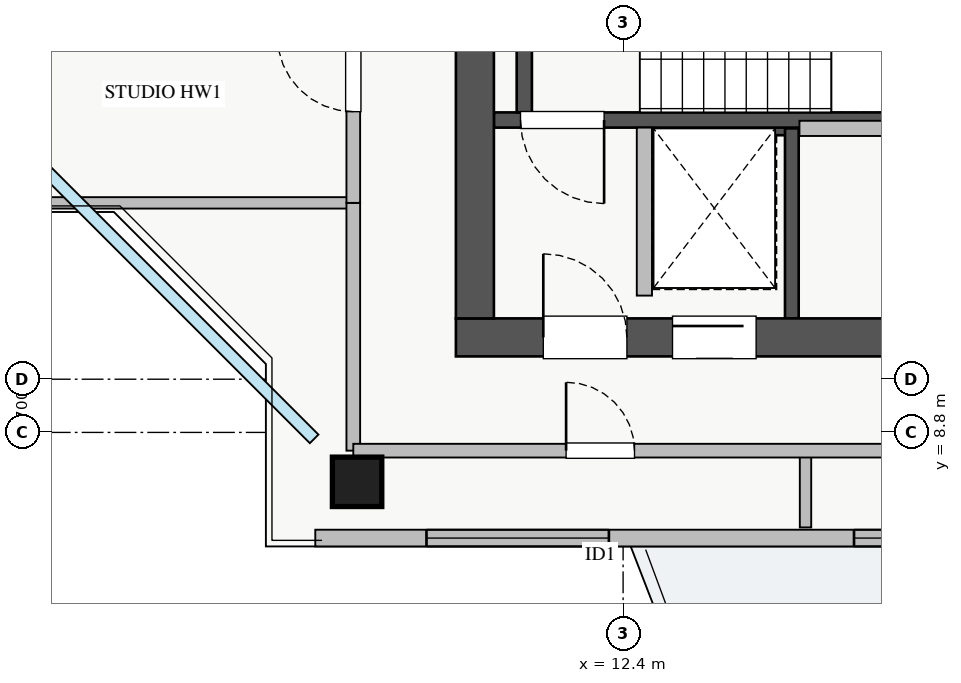
"""IFC4 building model, lengths in metres.
Left out: names, types, materials, properties, quantities, classifications, styles, units other than length and angle.
Written with IfcOpenShell. Run it as: python <this file> out.ifc"""

import sys

from ifc_helpers import new_model, si_unit, direction, frame, frame_2d, origin, origin_2d, place, context, subcontext, project, spatial, rectangle, extrude, source, transform, mapped, element, fill, save


model = new_model("IFC4")
c1 = context("Model", 3, precision=1e-05, world=origin(), true_north=direction((0.0, 1.0)))
c2 = subcontext(c1, "Body", "Model", "MODEL_VIEW")
j1 = project(units=[si_unit("LENGTHUNIT", "METRE"), si_unit("PLANEANGLEUNIT", "RADIAN")], contexts=[c1])
p1 = place(None, origin())
s1 = spatial("IfcSite", under=j1, at=p1, CompositionType="ELEMENT")
p2 = place(p1, origin())
s2 = spatial("IfcBuilding", under=s1, at=p2, CompositionType="ELEMENT")
p3 = place(p2, frame((0.0, 0.0, 256.75)))
s3 = spatial("IfcBuildingStorey", under=s2, at=p3, CompositionType="ELEMENT", Elevation=256.75)
p4 = place(p3, frame((12.68, 12.8, 0.0), z_axis=(0.0, 0.0, 1.0), x_axis=(1.0, 0.0, 0.0)))
e1 = element("IfcWall", 1, at=p4, inside=s3, PredefinedType="SHEAR", context=c2, shape_type="SweptSolid", body=[
    extrude(rectangle(XDim=1.94, YDim=0.18, at=frame_2d((0.97, 0.0))), origin(), (0.0, 0.0, 1.0), 3.07),
])
p5 = place(p3, frame((14.62, 10.3, 0.0), z_axis=(0.0, 0.0, 1.0), x_axis=(0.0, 1.0, 0.0)))
e2 = element("IfcWall", 2, at=p5, inside=s3, PredefinedType="SHEAR", context=c2, shape_type="SweptSolid", body=[
    extrude(rectangle(XDim=2.5, YDim=0.18, at=frame_2d((1.25, 0.0))), origin(), (0.0, 0.0, 1.0), 3.07),
])
p6 = place(p3, frame((10.7, 12.91, 0.0), z_axis=(0.0, 0.0, 1.0), x_axis=(1.0, 0.0, 0.0)))
e3 = element("IfcWall", 3, at=p6, inside=s3, PredefinedType="SHEAR", context=c2, shape_type="SweptSolid", body=[
    extrude(rectangle(XDim=7.45, YDim=0.2, at=frame_2d((3.725, 0.0))), origin(), (0.0, 0.0, 1.0), 3.25),
])
p7 = place(p6, frame((0.35, 0.0, 0.0)))
e4 = element("IfcOpeningElement", 4, at=p7, cuts=e3, PredefinedType="OPENING", context=c2, shape_type="SweptSolid", body=[
    extrude(rectangle(XDim=1.1, YDim=2.05, at=frame_2d((0.55, 1.025))), frame((0.0, 0.11, 0.0), z_axis=(0.0, -1.0, 0.0), x_axis=(1.0, 0.0, 0.0)), (0.0, 0.0, 1.0), 0.22),
])
p8 = place(p3, frame((11.1, 13.01, 0.0), z_axis=(0.0, 0.0, 1.0), x_axis=(0.0, 1.0, 0.0)))
e5 = element("IfcWall", 5, at=p8, inside=s3, PredefinedType="SHEAR", context=c2, shape_type="SweptSolid", body=[
    extrude(rectangle(XDim=2.94, YDim=0.2, at=frame_2d((1.47, 0.0))), origin(), (0.0, 0.0, 1.0), 3.25),
])
p9 = place(p3, frame((10.2, 10.05, 0.0), z_axis=(0.0, 0.0, 1.0), x_axis=(1.0, 0.0, 0.0)))
e6 = element("IfcWall", 6, at=p9, inside=s3, PredefinedType="SHEAR", context=c2, shape_type="SweptSolid", body=[
    extrude(rectangle(XDim=17.6, YDim=0.5, at=frame_2d((8.8, 0.0))), origin(), (0.0, 0.0, 1.0), 3.25),
])
p10 = place(p9, frame((1.15, 0.0, 0.0)))
e7 = element("IfcOpeningElement", 7, at=p10, cuts=e6, PredefinedType="OPENING", context=c2, shape_type="SweptSolid", body=[
    extrude(rectangle(XDim=1.1, YDim=2.05, at=frame_2d((0.55, 1.025))), frame((0.0, 0.26, 0.0), z_axis=(0.0, -1.0, 0.0), x_axis=(1.0, 0.0, 0.0)), (0.0, 0.0, 1.0), 0.52),
])
p11 = place(p9, frame((8.3, 0.0, 0.0)))
e8 = element("IfcOpeningElement", 8, at=p11, cuts=e6, PredefinedType="OPENING", context=c2, shape_type="SweptSolid", body=[
    extrude(rectangle(XDim=1.1, YDim=2.05, at=frame_2d((0.55, 1.025))), frame((0.0, 0.26, 0.0), z_axis=(0.0, -1.0, 0.0), x_axis=(1.0, 0.0, 0.0)), (0.0, 0.0, 1.0), 0.52),
])
p12 = place(p9, frame((2.85, 0.0, 0.0)))
e9 = element("IfcOpeningElement", 9, at=p12, cuts=e6, PredefinedType="OPENING", context=c2, shape_type="SweptSolid", body=[
    extrude(rectangle(XDim=1.1, YDim=2.05, at=frame_2d((0.55, 1.025))), frame((0.0, 0.26, 0.0), z_axis=(0.0, -1.0, 0.0), x_axis=(1.0, 0.0, 0.0)), (0.0, 0.0, 1.0), 0.52),
])
p13 = place(p9, frame((5.8, 0.0, 0.0)))
e10 = element("IfcOpeningElement", 10, at=p13, cuts=e6, PredefinedType="OPENING", context=c2, shape_type="SweptSolid", body=[
    extrude(rectangle(XDim=1.0, YDim=2.05, at=frame_2d((0.5, 1.025))), frame((0.0, 0.26, 0.0), z_axis=(0.0, -1.0, 0.0), x_axis=(1.0, 0.0, 0.0)), (0.0, 0.0, 1.0), 0.52),
])
p14 = place(p9, frame((14.74, 0.0, 0.0)))
e11 = element("IfcOpeningElement", 11, at=p14, cuts=e6, PredefinedType="OPENING", context=c2, shape_type="SweptSolid", body=[
    extrude(rectangle(XDim=1.0, YDim=2.05, at=frame_2d((0.5, 1.025))), frame((0.0, 0.26, 0.0), z_axis=(0.0, -1.0, 0.0), x_axis=(1.0, 0.0, 0.0)), (0.0, 0.0, 1.0), 0.52),
])
p15 = place(p9, frame((11.67, 0.0, 0.0)))
e12 = element("IfcOpeningElement", 12, at=p15, cuts=e6, PredefinedType="OPENING", context=c2, shape_type="SweptSolid", body=[
    extrude(rectangle(XDim=1.0, YDim=2.05, at=frame_2d((0.5, 1.025))), frame((0.0, 0.26, 0.0), z_axis=(0.0, -1.0, 0.0), x_axis=(1.0, 0.0, 0.0)), (0.0, 0.0, 1.0), 0.52),
])
p16 = place(p3, frame((10.45, 10.3, 0.0), z_axis=(0.0, 0.0, 1.0), x_axis=(0.0, 1.0, 0.0)))
e13 = element("IfcWall", 13, at=p16, inside=s3, PredefinedType="SHEAR", context=c2, shape_type="SweptSolid", body=[
    extrude(rectangle(XDim=6.2, YDim=0.5, at=frame_2d((3.1, 0.0))), origin(), (0.0, 0.0, 1.0), 3.25),
])
m1 = source(origin(), c2, "Body", "SweptSolid", [
    extrude(rectangle(XDim=0.65, YDim=0.65, at=origin_2d()), origin(), (0.0, 0.0, 1.0), 3.25),
])
p17 = place(p3, frame((8.9, 8.15, 0.0), z_axis=(0.0, 0.0, 1.0), x_axis=(1.0, 0.0, 0.0)))
e14 = element("IfcColumn", 14, at=p17, inside=s3, PredefinedType="COLUMN", context=c2, shape_type="MappedRepresentation", body=[
    mapped(m1, transform((0.0, 0.0, 0.0), x_axis=(1.0, 0.0, 0.0), y_axis=(0.0, 1.0, 0.0), z_axis=(0.0, 0.0, 1.0), scale=1.0)),
])
p18 = place(p3, frame((8.35, 7.41, 0.0), z_axis=(0.0, 0.0, 1.0), x_axis=(1.0, 0.0, 0.0)))
e15 = element("IfcWall", 15, at=p18, inside=s3, PredefinedType="STANDARD", context=c2, shape_type="SweptSolid", body=[
    extrude(rectangle(XDim=21.3, YDim=0.22, at=frame_2d((10.65, 0.0))), origin(), (0.0, 0.0, 1.0), 2.61),
])
p19 = place(p18, frame((11.5, 0.0, 0.0)))
e16 = element("IfcOpeningElement", 16, at=p19, cuts=e15, PredefinedType="OPENING", context=c2, shape_type="SweptSolid", body=[
    extrude(rectangle(XDim=1.2, YDim=2.1, at=frame_2d((0.6, 1.05))), frame((0.0, 0.12, 0.0), z_axis=(0.0, -1.0, 0.0), x_axis=(1.0, 0.0, 0.0)), (0.0, 0.0, 1.0), 0.24),
])
p20 = place(p18, frame((1.463, 0.0, 0.9)))
e17 = element("IfcOpeningElement", 17, at=p20, cuts=e15, PredefinedType="OPENING", context=c2, shape_type="SweptSolid", body=[
    extrude(rectangle(XDim=2.4, YDim=1.48, at=frame_2d((1.2, 0.74))), frame((0.0, 0.12, 0.0), z_axis=(0.0, -1.0, 0.0), x_axis=(1.0, 0.0, 0.0)), (0.0, 0.0, 1.0), 0.24),
])
p21 = place(p18, frame((7.088, 0.0, 0.9)))
e18 = element("IfcOpeningElement", 18, at=p21, cuts=e15, PredefinedType="OPENING", context=c2, shape_type="SweptSolid", body=[
    extrude(rectangle(XDim=1.8, YDim=1.45, at=frame_2d((0.9, 0.725))), frame((0.0, 0.12, 0.0), z_axis=(0.0, -1.0, 0.0), x_axis=(1.0, 0.0, 0.0)), (0.0, 0.0, 1.0), 0.24),
])
p22 = place(p18, frame((19.775, 0.0, 0.9)))
e19 = element("IfcOpeningElement", 19, at=p22, cuts=e15, PredefinedType="OPENING", context=c2, shape_type="SweptSolid", body=[
    extrude(rectangle(XDim=1.2, YDim=1.4, at=frame_2d((0.6, 0.7))), frame((0.0, 0.12, 0.0), z_axis=(0.0, -1.0, 0.0), x_axis=(1.0, 0.0, 0.0)), (0.0, 0.0, 1.0), 0.24),
])
p23 = place(p18, frame((15.042, 0.0, 0.9)))
e20 = element("IfcOpeningElement", 20, at=p23, cuts=e15, PredefinedType="OPENING", context=c2, shape_type="SweptSolid", body=[
    extrude(rectangle(XDim=2.4, YDim=1.5, at=frame_2d((1.2, 0.75))), frame((0.0, 0.12, 0.0), z_axis=(0.0, -1.0, 0.0), x_axis=(1.0, 0.0, 0.0)), (0.0, 0.0, 1.0), 0.24),
])
p24 = place(p3, frame((12.68, 10.6, 0.0), z_axis=(0.0, 0.0, 1.0), x_axis=(0.0, 1.0, 0.0)))
e21 = element("IfcWall", 21, at=p24, inside=s3, PredefinedType="PARTITIONING", context=c2, shape_type="SweptSolid", body=[
    extrude(rectangle(XDim=2.21, YDim=0.2, at=frame_2d((1.105, 0.0))), origin(), (0.0, 0.0, 1.0), 3.07),
])
p25 = place(p3, frame((14.72, 12.8, 0.0), z_axis=(0.0, 0.0, 1.0), x_axis=(1.0, 0.0, 0.0)))
e22 = element("IfcWall", 22, at=p25, inside=s3, PredefinedType="PARTITIONING", context=c2, shape_type="SweptSolid", body=[
    extrude(rectangle(XDim=3.28, YDim=0.2, at=frame_2d((1.64, 0.0))), origin(), (0.0, 0.0, 1.0), 3.07),
])
p26 = place(p3, frame((3.55, 11.82, 0.0), z_axis=(0.0, 0.0, 1.0), x_axis=(1.0, 0.0, 0.0)))
e23 = element("IfcWall", 23, at=p26, inside=s3, PredefinedType="PARTITIONING", context=c2, shape_type="SweptSolid", body=[
    extrude(rectangle(XDim=5.3, YDim=0.15, at=frame_2d((2.65, 0.0))), origin(), (0.0, 0.0, 1.0), 3.07),
])
p27 = place(p3, frame((8.85, 8.56, 0.0), z_axis=(0.0, 0.0, 1.0), x_axis=(0.0, 1.0, 0.0)))
e24 = element("IfcWall", 24, at=p27, inside=s3, PredefinedType="PARTITIONING", context=c2, shape_type="SweptSolid", body=[
    extrude(rectangle(XDim=3.26, YDim=0.18, at=frame_2d((1.63, 0.0))), origin(), (0.0, 0.0, 1.0), 2.569),
])
p28 = place(p3, frame((14.8, 7.55, 0.0), z_axis=(0.0, 0.0, 1.0), x_axis=(0.0, 1.0, 0.0)))
e25 = element("IfcWall", 25, at=p28, inside=s3, PredefinedType="PARTITIONING", context=c2, shape_type="SweptSolid", body=[
    extrude(rectangle(XDim=1.01, YDim=0.15, at=frame_2d((0.505, 0.0))), origin(), (0.0, 0.0, 1.0), 3.07),
])
p29 = place(p3, frame((8.85, 8.56, 0.0), z_axis=(0.0, 0.0, 1.0), x_axis=(1.0, 0.0, 0.0)))
e26 = element("IfcWall", 26, at=p29, inside=s3, PredefinedType="PARTITIONING", context=c2, shape_type="SweptSolid", body=[
    extrude(rectangle(XDim=18.95, YDim=0.18, at=frame_2d((9.475, 0.0))), origin(), (0.0, 0.0, 1.0), 3.07),
])
p30 = place(p29, frame((2.8, 0.0, 0.0)))
e27 = element("IfcOpeningElement", 27, at=p30, cuts=e26, PredefinedType="OPENING", context=c2, shape_type="SweptSolid", body=[
    extrude(rectangle(XDim=0.9, YDim=2.05, at=frame_2d((0.45, 1.025))), frame((0.0, 0.1, 0.0), z_axis=(0.0, -1.0, 0.0), x_axis=(1.0, 0.0, 0.0)), (0.0, 0.0, 1.0), 0.2),
])
p31 = place(p29, frame((8.8, 0.0, 0.0)))
e28 = element("IfcOpeningElement", 28, at=p31, cuts=e26, PredefinedType="OPENING", context=c2, shape_type="SweptSolid", body=[
    extrude(rectangle(XDim=0.9, YDim=2.05, at=frame_2d((0.45, 1.025))), frame((0.0, 0.1, 0.0), z_axis=(0.0, -1.0, 0.0), x_axis=(1.0, 0.0, 0.0)), (0.0, 0.0, 1.0), 0.2),
])
p32 = place(p29, frame((15.2, 0.0, 0.0)))
e29 = element("IfcOpeningElement", 29, at=p32, cuts=e26, PredefinedType="OPENING", context=c2, shape_type="SweptSolid", body=[
    extrude(rectangle(XDim=0.9, YDim=2.05, at=frame_2d((0.45, 1.025))), frame((0.0, 0.1, 0.0), z_axis=(0.0, -1.0, 0.0), x_axis=(1.0, 0.0, 0.0)), (0.0, 0.0, 1.0), 0.2),
])
p33 = place(p3, frame((8.85, 11.82, 0.0), z_axis=(0.0, 0.0, 1.0), x_axis=(0.0, 1.0, 0.0)))
e30 = element("IfcWall", 30, at=p33, inside=s3, PredefinedType="PARTITIONING", context=c2, shape_type="SweptSolid", body=[
    extrude(rectangle(XDim=22.36, YDim=0.18, at=frame_2d((11.18, 0.0))), origin(), (0.0, 0.0, 1.0), 2.569),
])
p34 = place(p33, frame((1.2, 0.0, 0.0)))
e31 = element("IfcOpeningElement", 31, at=p34, cuts=e30, PredefinedType="OPENING", context=c2, shape_type="SweptSolid", body=[
    extrude(rectangle(XDim=1.0, YDim=2.05, at=frame_2d((0.5, 1.025))), frame((0.0, 0.1, 0.0), z_axis=(0.0, -1.0, 0.0), x_axis=(1.0, 0.0, 0.0)), (0.0, 0.0, 1.0), 0.2),
])
p35 = place(p33, frame((8.445, 0.0, 0.0)))
e32 = element("IfcOpeningElement", 32, at=p35, cuts=e30, PredefinedType="OPENING", context=c2, shape_type="SweptSolid", body=[
    extrude(rectangle(XDim=1.0, YDim=2.05, at=frame_2d((0.5, 1.025))), frame((0.0, 0.1, 0.0), z_axis=(0.0, -1.0, 0.0), x_axis=(1.0, 0.0, 0.0)), (0.0, 0.0, 1.0), 0.2),
])
p36 = place(p33, frame((16.23, 0.0, 0.0)))
e33 = element("IfcOpeningElement", 33, at=p36, cuts=e30, PredefinedType="OPENING", context=c2, shape_type="SweptSolid", body=[
    extrude(rectangle(XDim=1.0, YDim=2.05, at=frame_2d((0.5, 1.025))), frame((0.0, 0.1, 0.0), z_axis=(0.0, -1.0, 0.0), x_axis=(1.0, 0.0, 0.0)), (0.0, 0.0, 1.0), 0.2),
])
m2 = source(origin(), c2, "Body", "SweptSolid", [
    extrude(rectangle(XDim=2.4, YDim=1.48, at=frame_2d((1.2, 0.74))), frame((0.0, 0.03, 0.0), z_axis=(0.0, -1.0, 0.0), x_axis=(1.0, 0.0, 0.0)), (0.0, 0.0, 1.0), 0.06),
])
p37 = place(p20, origin())
e34 = element("IfcWindow", 34, at=p37, inside=s3, PartitioningType="TRIPLE_PANEL_VERTICAL", PredefinedType="WINDOW", context=c2, shape_type="MappedRepresentation", body=[
    mapped(m2, transform((0.0, 0.0, 0.0), x_axis=(1.0, 0.0, 0.0), y_axis=(0.0, 1.0, 0.0), z_axis=(0.0, 0.0, 1.0), scale=1.0)),
])
fill(e17, e34)
m3 = source(origin(), c2, "Body", "SweptSolid", [
    extrude(rectangle(XDim=1.8, YDim=1.45, at=frame_2d((0.9, 0.725))), frame((0.0, 0.03, 0.0), z_axis=(0.0, -1.0, 0.0), x_axis=(1.0, 0.0, 0.0)), (0.0, 0.0, 1.0), 0.06),
])
p38 = place(p21, origin())
e35 = element("IfcWindow", 35, at=p38, inside=s3, PartitioningType="DOUBLE_PANEL_VERTICAL", PredefinedType="WINDOW", context=c2, shape_type="MappedRepresentation", body=[
    mapped(m3, transform((0.0, 0.0, 0.0), x_axis=(1.0, 0.0, 0.0), y_axis=(0.0, 1.0, 0.0), z_axis=(0.0, 0.0, 1.0), scale=1.0)),
])
fill(e18, e35)
m4 = source(origin(), c2, "Body", "SweptSolid", [
    extrude(rectangle(XDim=1.1, YDim=2.05, at=frame_2d((0.55, 1.025))), frame((0.0, 0.025, 0.0), z_axis=(0.0, -1.0, 0.0), x_axis=(1.0, 0.0, 0.0)), (0.0, 0.0, 1.0), 0.05),
])
p39 = place(p10, origin())
e36 = element("IfcDoor", 36, at=p39, inside=s3, OperationType="SINGLE_SWING_LEFT", PredefinedType="DOOR", context=c2, shape_type="MappedRepresentation", body=[
    mapped(m4, transform((0.0, 0.0, 0.0), x_axis=(1.0, 0.0, 0.0), y_axis=(0.0, 1.0, 0.0), z_axis=(0.0, 0.0, 1.0), scale=1.0)),
])
fill(e7, e36)
p40 = place(p7, frame((1.1, 0.0, 0.0), z_axis=(0.0, 0.0, 1.0), x_axis=(-1.0, 0.0, 0.0)))
e37 = element("IfcDoor", 37, at=p40, inside=s3, OperationType="SINGLE_SWING_RIGHT", PredefinedType="DOOR", context=c2, shape_type="MappedRepresentation", body=[
    mapped(m4, transform((0.0, 0.0, 0.0), x_axis=(1.0, 0.0, 0.0), y_axis=(0.0, 1.0, 0.0), z_axis=(0.0, 0.0, 1.0), scale=1.0)),
])
fill(e4, e37)
p41 = place(p12, origin())
e38 = element("IfcDoor", 38, at=p41, inside=s3, OperationType="SLIDING_TO_RIGHT", PredefinedType="DOOR", context=c2, shape_type="MappedRepresentation", body=[
    mapped(m4, transform((0.0, 0.0, 0.0), x_axis=(1.0, 0.0, 0.0), y_axis=(0.0, 1.0, 0.0), z_axis=(0.0, 0.0, 1.0), scale=1.0)),
])
fill(e9, e38)
m5 = source(origin(), c2, "Body", "SweptSolid", [
    extrude(rectangle(XDim=0.9, YDim=2.05, at=frame_2d((0.45, 1.025))), frame((0.0, 0.025, 0.0), z_axis=(0.0, -1.0, 0.0), x_axis=(1.0, 0.0, 0.0)), (0.0, 0.0, 1.0), 0.05),
])
p42 = place(p30, origin())
e39 = element("IfcDoor", 39, at=p42, inside=s3, OperationType="SINGLE_SWING_LEFT", PredefinedType="DOOR", context=c2, shape_type="MappedRepresentation", body=[
    mapped(m5, transform((0.0, 0.0, 0.0), x_axis=(1.0, 0.0, 0.0), y_axis=(0.0, 1.0, 0.0), z_axis=(0.0, 0.0, 1.0), scale=1.0)),
])
fill(e27, e39)
m6 = source(origin(), c2, "Body", "SweptSolid", [
    extrude(rectangle(XDim=1.0, YDim=2.05, at=frame_2d((0.5, 1.025))), frame((0.0, 0.025, 0.0), z_axis=(0.0, -1.0, 0.0), x_axis=(1.0, 0.0, 0.0)), (0.0, 0.0, 1.0), 0.05),
])
p43 = place(p34, origin())
e40 = element("IfcDoor", 40, at=p43, inside=s3, OperationType="SINGLE_SWING_RIGHT", PredefinedType="DOOR", context=c2, shape_type="MappedRepresentation", body=[
    mapped(m6, transform((0.0, 0.0, 0.0), x_axis=(1.0, 0.0, 0.0), y_axis=(0.0, 1.0, 0.0), z_axis=(0.0, 0.0, 1.0), scale=1.0)),
])
fill(e31, e40)
save(model, sys.argv[1])
